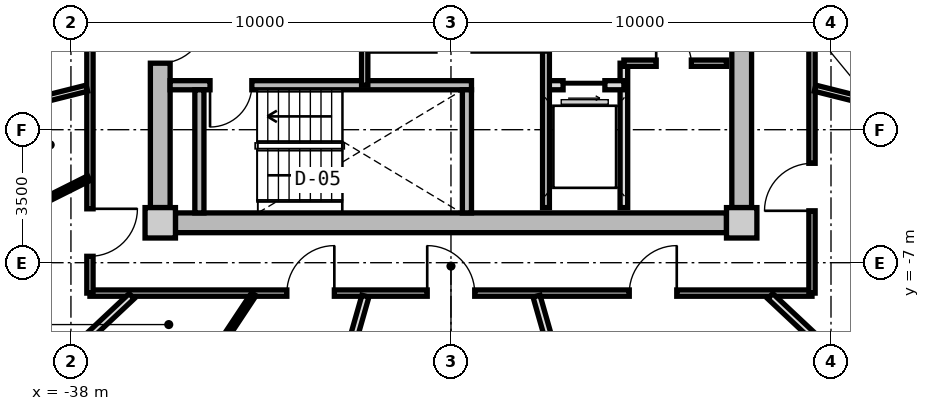
"""IFC4 building model, lengths in metres.
Left out: names, types, materials, properties, quantities, classifications, styles, units other than length and angle.
Written with IfcOpenShell. Run it as: python <this file> out.ifc"""

import sys

from ifc_helpers import new_model, si_unit, direction, frame, frame_2d, origin, origin_2d, place, context, subcontext, project, spatial, rectangle, extrude, source, transform, mapped, element, fill, save


model = new_model("IFC4")
c1 = context("Model", 3, precision=1e-05, world=origin(), true_north=direction((0.0, 1.0)))
c2 = subcontext(c1, "Body", "Model", "MODEL_VIEW")
j1 = project(units=[si_unit("LENGTHUNIT", "METRE"), si_unit("PLANEANGLEUNIT", "RADIAN")], contexts=[c1])
p1 = place(None, origin())
s1 = spatial("IfcSite", under=j1, at=p1, CompositionType="ELEMENT")
p2 = place(p1, origin())
s2 = spatial("IfcBuilding", under=s1, at=p2, CompositionType="ELEMENT")
p3 = place(p2, frame((0.0, 0.0, 213.9)))
s3 = spatial("IfcBuildingStorey", under=s2, at=p3, CompositionType="ELEMENT", Elevation=213.9)
m1 = source(origin(), c2, "Body", "SweptSolid", [
    extrude(rectangle(XDim=0.8, YDim=0.8, at=origin_2d()), origin(), (0.0, 0.0, 1.0), 3.05),
])
for number, where, z_axis, x_axis in (
    (1, (-35.65, -5.95, 0.0), (0.0, 0.0, 1.0), (1.0, 0.0, 0.0)),
    (2, (-20.35, -5.95, 0.0), (0.0, 0.0, 1.0), (1.0, 0.0, 0.0)),
):
    element("IfcColumn", number, at=place(p3, frame(where, z_axis=z_axis, x_axis=x_axis)), inside=s3, PredefinedType="COLUMN", context=c2, shape_type="MappedRepresentation", body=[
        mapped(m1, transform((0.0, 0.0, 0.0), x_axis=(1.0, 0.0, 0.0), y_axis=(0.0, 1.0, 0.0), z_axis=(0.0, 0.0, 1.0), scale=1.0)),
    ])
m2 = source(origin(), c2, "Body", "SweptSolid", [
    extrude(rectangle(XDim=14.5, YDim=0.52, at=frame_2d((7.25, 0.0))), origin(), (0.0, 0.0, 1.0), 2.76),
])
p4 = place(p3, frame((-20.75, -5.95, 0.0), z_axis=(0.0, 0.0, 1.0), x_axis=(-1.0, 0.0, 0.0)))
e3 = element("IfcWall", 3, at=p4, inside=s3, PredefinedType="SHEAR", context=c2, shape_type="MappedRepresentation", body=[
    mapped(m2, transform((0.0, 0.0, 0.0), x_axis=(1.0, 0.0, 0.0), y_axis=(0.0, 1.0, 0.0), z_axis=(0.0, 0.0, 1.0), scale=1.0)),
])
m3 = source(origin(), c2, "Body", "SweptSolid", [
    extrude(rectangle(XDim=11.1, YDim=0.52, at=frame_2d((5.55, 0.0))), origin(), (0.0, 0.0, 1.0), 2.76),
])
p5 = place(p3, frame((-35.65, -5.55, 0.0), z_axis=(0.0, 0.0, 1.0), x_axis=(0.0, 1.0, 0.0)))
e4 = element("IfcWall", 4, at=p5, inside=s3, PredefinedType="SHEAR", context=c2, shape_type="MappedRepresentation", body=[
    mapped(m3, transform((0.0, 0.0, 0.0), x_axis=(1.0, 0.0, 0.0), y_axis=(0.0, 1.0, 0.0), z_axis=(0.0, 0.0, 1.0), scale=1.0)),
])
p6 = place(p5, frame((3.8, 0.0, 0.0)))
e5 = element("IfcOpeningElement", 5, at=p6, cuts=e4, PredefinedType="OPENING", context=c2, shape_type="SweptSolid", body=[
    extrude(rectangle(XDim=1.2, YDim=2.15, at=frame_2d((0.6, 1.075))), frame((0.0, 0.27, 0.0), z_axis=(0.0, -1.0, 0.0), x_axis=(1.0, 0.0, 0.0)), (0.0, 0.0, 1.0), 0.54),
])
p7 = place(p3, frame((-20.35, 5.55, 0.0), z_axis=(0.0, 0.0, 1.0), x_axis=(0.0, -1.0, 0.0)))
e6 = element("IfcWall", 6, at=p7, inside=s3, PredefinedType="SHEAR", context=c2, shape_type="MappedRepresentation", body=[
    mapped(m3, transform((0.0, 0.0, 0.0), x_axis=(1.0, 0.0, 0.0), y_axis=(0.0, 1.0, 0.0), z_axis=(0.0, 0.0, 1.0), scale=1.0)),
])
p8 = place(p7, frame((5.65, 0.0, 0.0)))
e7 = element("IfcOpeningElement", 7, at=p8, cuts=e6, PredefinedType="OPENING", context=c2, shape_type="SweptSolid", body=[
    extrude(rectangle(XDim=1.2, YDim=2.15, at=frame_2d((0.6, 1.075))), frame((0.0, 0.27, 0.0), z_axis=(0.0, -1.0, 0.0), x_axis=(1.0, 0.0, 0.0)), (0.0, 0.0, 1.0), 0.54),
])
m4 = source(origin(), c2, "Body", "SweptSolid", [
    extrude(rectangle(XDim=7.93, YDim=0.24, at=frame_2d((3.965, 0.0))), origin(), (0.0, 0.0, 1.0), 2.76),
])
p9 = place(p3, frame((-35.39, -2.33, 0.0), z_axis=(0.0, 0.0, 1.0), x_axis=(1.0, 0.0, 0.0)))
e8 = element("IfcWall", 8, at=p9, inside=s3, PredefinedType="PARTITIONING", context=c2, shape_type="MappedRepresentation", body=[
    mapped(m4, transform((0.0, 0.0, 0.0), x_axis=(1.0, 0.0, 0.0), y_axis=(0.0, 1.0, 0.0), z_axis=(0.0, 0.0, 1.0), scale=1.0)),
])
p10 = place(p9, frame((1.05, 0.0, 0.0)))
e9 = element("IfcOpeningElement", 9, at=p10, cuts=e8, PredefinedType="OPENING", context=c2, shape_type="SweptSolid", body=[
    extrude(rectangle(XDim=1.1, YDim=2.15, at=frame_2d((0.55, 1.075))), frame((0.0, 0.13, 0.0), z_axis=(0.0, -1.0, 0.0), x_axis=(1.0, 0.0, 0.0)), (0.0, 0.0, 1.0), 0.26),
])
m5 = source(origin(), c2, "Body", "SweptSolid", [
    extrude(rectangle(XDim=3.24, YDim=0.24, at=frame_2d((1.62, 0.0))), origin(), (0.0, 0.0, 1.0), 2.76),
])
for number, where, z_axis, x_axis in (
    (10, (-34.62, -5.69, 0.0), (0.0, 0.0, 1.0), (0.0, 1.0, 0.0)),
    (11, (-27.58, -5.69, 0.0), (0.0, 0.0, 1.0), (0.0, 1.0, 0.0)),
):
    element("IfcWall", number, at=place(p3, frame(where, z_axis=z_axis, x_axis=x_axis)), inside=s3, PredefinedType="PARTITIONING", context=c2, shape_type="MappedRepresentation", body=[
        mapped(m5, transform((0.0, 0.0, 0.0), x_axis=(1.0, 0.0, 0.0), y_axis=(0.0, 1.0, 0.0), z_axis=(0.0, 0.0, 1.0), scale=1.0)),
    ])
m6 = source(origin(), c2, "Body", "SweptSolid", [
    extrude(rectangle(XDim=3.8, YDim=0.2, at=frame_2d((1.9, 0.0))), origin(), (0.0, 0.0, 1.0), 2.745),
])
p11 = place(p3, frame((-23.45, -5.55, 0.0), z_axis=(0.0, 0.0, 1.0), x_axis=(0.0, 1.0, 0.0)))
e12 = element("IfcWall", 12, at=p11, inside=s3, PredefinedType="PARTITIONING", context=c2, shape_type="MappedRepresentation", body=[
    mapped(m6, transform((0.0, 0.0, 0.0), x_axis=(1.0, 0.0, 0.0), y_axis=(0.0, 1.0, 0.0), z_axis=(0.0, 0.0, 1.0), scale=1.0)),
])
m7 = source(origin(), c2, "Body", "SweptSolid", [
    extrude(rectangle(XDim=2.05, YDim=0.24, at=frame_2d((1.025, 0.0))), origin(), (0.0, 0.0, 1.0), 2.745),
])
p12 = place(p3, frame((-25.5, -2.33, 0.0), z_axis=(0.0, 0.0, 1.0), x_axis=(1.0, 0.0, 0.0)))
e13 = element("IfcWall", 13, at=p12, inside=s3, PredefinedType="PARTITIONING", context=c2, shape_type="MappedRepresentation", body=[
    mapped(m7, transform((0.0, 0.0, 0.0), x_axis=(1.0, 0.0, 0.0), y_axis=(0.0, 1.0, 0.0), z_axis=(0.0, 0.0, 1.0), scale=1.0)),
])
p13 = place(p12, frame((0.45, 0.0, 0.0)))
e14 = element("IfcOpeningElement", 14, at=p13, cuts=e13, PredefinedType="OPENING", context=c2, shape_type="SweptSolid", body=[
    extrude(rectangle(XDim=1.1, YDim=2.2, at=frame_2d((0.55, 1.1))), frame((0.0, 0.13, 0.0), z_axis=(0.0, -1.0, 0.0), x_axis=(1.0, 0.0, 0.0)), (0.0, 0.0, 1.0), 0.26),
])
m8 = source(origin(), c2, "Body", "SweptSolid", [
    extrude(rectangle(XDim=4.2, YDim=0.18, at=frame_2d((2.1, 0.0))), origin(), (0.0, 0.0, 1.0), 2.745),
])
p14 = place(p3, frame((-25.5, -5.55, 0.0), z_axis=(0.0, 0.0, 1.0), x_axis=(0.0, 1.0, 0.0)))
e15 = element("IfcWall", 15, at=p14, inside=s3, PredefinedType="PARTITIONING", context=c2, shape_type="MappedRepresentation", body=[
    mapped(m8, transform((0.0, 0.0, 0.0), x_axis=(1.0, 0.0, 0.0), y_axis=(0.0, 1.0, 0.0), z_axis=(0.0, 0.0, 1.0), scale=1.0)),
])
m9 = source(origin(), c2, "Body", "SweptSolid", [
    extrude(rectangle(XDim=0.98, YDim=0.165, at=frame_2d((0.49, 0.0))), origin(), (0.0, 0.0, 1.0), 2.745),
])
p15 = place(p3, frame((-30.27, -2.33, 0.0), z_axis=(0.0, 0.0, 1.0), x_axis=(0.0, 1.0, 0.0)))
e16 = element("IfcWall", 16, at=p15, inside=s3, PredefinedType="PARTITIONING", context=c2, shape_type="MappedRepresentation", body=[
    mapped(m9, transform((0.0, 0.0, 0.0), x_axis=(1.0, 0.0, 0.0), y_axis=(0.0, 1.0, 0.0), z_axis=(0.0, 0.0, 1.0), scale=1.0)),
])
m10 = source(origin(), c2, "Body", "SweptSolid", [
    extrude(rectangle(XDim=2.7, YDim=0.165, at=frame_2d((1.35, 0.0))), origin(), (0.0, 0.0, 1.0), 2.745),
])
p16 = place(p3, frame((-23.45, -1.75, 0.0), z_axis=(0.0, 0.0, 1.0), x_axis=(1.0, 0.0, 0.0)))
e17 = element("IfcWall", 17, at=p16, inside=s3, PredefinedType="PARTITIONING", context=c2, shape_type="MappedRepresentation", body=[
    mapped(m10, transform((0.0, 0.0, 0.0), x_axis=(1.0, 0.0, 0.0), y_axis=(0.0, 1.0, 0.0), z_axis=(0.0, 0.0, 1.0), scale=1.0)),
])
p17 = place(p16, frame((0.85, 0.0, 0.0)))
e18 = element("IfcOpeningElement", 18, at=p17, cuts=e17, PredefinedType="OPENING", context=c2, shape_type="SweptSolid", body=[
    extrude(rectangle(XDim=0.925, YDim=2.1, at=frame_2d((0.462, 1.05))), frame((0.0, 0.093, 0.0), z_axis=(0.0, -1.0, 0.0), x_axis=(1.0, 0.0, 0.0)), (0.0, 0.0, 1.0), 0.185),
])
m11 = source(origin(), c2, "Body", "SweptSolid", [
    extrude(rectangle(XDim=19.0, YDim=0.165, at=frame_2d((9.5, 0.0))), origin(), (0.0, 0.0, 1.0), 2.745),
])
p18 = place(p3, frame((-18.5, -7.8, 0.0), z_axis=(0.0, 0.0, 1.0), x_axis=(-1.0, 0.0, 0.0)))
e19 = element("IfcWall", 19, at=p18, inside=s3, PredefinedType="PARTITIONING", context=c2, shape_type="MappedRepresentation", body=[
    mapped(m11, transform((0.0, 0.0, 0.0), x_axis=(1.0, 0.0, 0.0), y_axis=(0.0, 1.0, 0.0), z_axis=(0.0, 0.0, 1.0), scale=1.0)),
])
p19 = place(p18, frame((12.569, 0.0, 0.0)))
e20 = element("IfcOpeningElement", 20, at=p19, cuts=e19, PredefinedType="OPENING", context=c2, shape_type="SweptSolid", body=[
    extrude(rectangle(XDim=1.25, YDim=2.2, at=frame_2d((0.625, 1.1))), frame((0.0, 0.093, 0.0), z_axis=(0.0, -1.0, 0.0), x_axis=(1.0, 0.0, 0.0)), (0.0, 0.0, 1.0), 0.185),
])
p20 = place(p18, frame((8.875, 0.0, 0.0)))
e21 = element("IfcOpeningElement", 21, at=p20, cuts=e19, PredefinedType="OPENING", context=c2, shape_type="SweptSolid", body=[
    extrude(rectangle(XDim=1.25, YDim=2.2, at=frame_2d((0.625, 1.1))), frame((0.0, 0.093, 0.0), z_axis=(0.0, -1.0, 0.0), x_axis=(1.0, 0.0, 0.0)), (0.0, 0.0, 1.0), 0.185),
])
p21 = place(p18, frame((3.559, 0.0, 0.0)))
e22 = element("IfcOpeningElement", 22, at=p21, cuts=e19, PredefinedType="OPENING", context=c2, shape_type="SweptSolid", body=[
    extrude(rectangle(XDim=1.25, YDim=2.2, at=frame_2d((0.625, 1.1))), frame((0.0, 0.093, 0.0), z_axis=(0.0, -1.0, 0.0), x_axis=(1.0, 0.0, 0.0)), (0.0, 0.0, 1.0), 0.185),
])
m12 = source(origin(), c2, "Body", "SweptSolid", [
    extrude(rectangle(XDim=6.88, YDim=0.165, at=frame_2d((3.44, 0.0))), origin(), (0.0, 0.0, 1.0), 2.745),
])
p22 = place(p3, frame((-37.5, -7.8, 0.0), z_axis=(0.0, 0.0, 1.0), x_axis=(0.0, 1.0, 0.0)))
e23 = element("IfcWall", 23, at=p22, inside=s3, PredefinedType="PARTITIONING", context=c2, shape_type="MappedRepresentation", body=[
    mapped(m12, transform((0.0, 0.0, 0.0), x_axis=(1.0, 0.0, 0.0), y_axis=(0.0, 1.0, 0.0), z_axis=(0.0, 0.0, 1.0), scale=1.0)),
])
p23 = place(p22, frame((0.968, 0.0, 0.0)))
e24 = element("IfcOpeningElement", 24, at=p23, cuts=e23, PredefinedType="OPENING", context=c2, shape_type="SweptSolid", body=[
    extrude(rectangle(XDim=1.25, YDim=2.2, at=frame_2d((0.625, 1.1))), frame((0.0, 0.093, 0.0), z_axis=(0.0, -1.0, 0.0), x_axis=(1.0, 0.0, 0.0)), (0.0, 0.0, 1.0), 0.185),
])
p24 = place(p3, frame((-18.5, -0.92, 0.0), z_axis=(0.0, 0.0, 1.0), x_axis=(0.0, -1.0, 0.0)))
e25 = element("IfcWall", 25, at=p24, inside=s3, PredefinedType="PARTITIONING", context=c2, shape_type="MappedRepresentation", body=[
    mapped(m12, transform((0.0, 0.0, 0.0), x_axis=(1.0, 0.0, 0.0), y_axis=(0.0, 1.0, 0.0), z_axis=(0.0, 0.0, 1.0), scale=1.0)),
])
p25 = place(p24, frame((3.464, 0.0, 0.0)))
e26 = element("IfcOpeningElement", 26, at=p25, cuts=e25, PredefinedType="OPENING", context=c2, shape_type="SweptSolid", body=[
    extrude(rectangle(XDim=1.25, YDim=2.2, at=frame_2d((0.625, 1.1))), frame((0.0, 0.093, 0.0), z_axis=(0.0, -1.0, 0.0), x_axis=(1.0, 0.0, 0.0)), (0.0, 0.0, 1.0), 0.185),
])
m13 = source(origin(), c2, "Body", "SweptSolid", [
    extrude(rectangle(XDim=6.157, YDim=0.165, at=frame_2d((3.079, 0.0))), origin(), (0.0, 0.0, 1.0), 2.345),
])
for number, where, z_axis, x_axis in (
    (27, (-37.58, -2.407, 0.0), (0.0, 0.0, 1.0), (-0.97, -0.244, 0.0)),
    (28, (-18.42, -2.407, 0.0), (0.0, 0.0, 1.0), (0.97, -0.244, 0.0)),
):
    element("IfcWall", number, at=place(p3, frame(where, z_axis=z_axis, x_axis=x_axis)), inside=s3, PredefinedType="PARTITIONING", context=c2, shape_type="MappedRepresentation", body=[
        mapped(m13, transform((0.0, 0.0, 0.0), x_axis=(1.0, 0.0, 0.0), y_axis=(0.0, 1.0, 0.0), z_axis=(0.0, 0.0, 1.0), scale=1.0)),
    ])
m14 = source(origin(), c2, "Body", "SweptSolid", [
    extrude(rectangle(XDim=4.089, YDim=0.19, at=frame_2d((2.044, 0.0))), origin(), (0.0, 0.0, 1.0), 2.345),
])
p26 = place(p3, frame((-36.402, -7.88, 0.0), z_axis=(0.0, 0.0, 1.0), x_axis=(-0.729401273609, -0.684086092577, 0.0)))
e29 = element("IfcWall", 29, at=p26, inside=s3, PredefinedType="PARTITIONING", context=c2, shape_type="MappedRepresentation", body=[
    mapped(m14, transform((0.0, 0.0, 0.0), x_axis=(1.0, 0.0, 0.0), y_axis=(0.0, 1.0, 0.0), z_axis=(0.0, 0.0, 1.0), scale=1.0)),
])
m15 = source(origin(), c2, "Body", "SweptSolid", [
    extrude(rectangle(XDim=2.06, YDim=0.14, at=frame_2d((1.03, 0.0))), origin(), (0.0, 0.0, 1.0), 2.745),
])
p27 = place(p3, frame((-37.53, -4.778, 0.0), z_axis=(0.0, 0.0, 1.0), x_axis=(-0.893952568722, -0.448161583444, 0.0)))
e30 = element("IfcWall", 30, at=p27, inside=s3, PredefinedType="PARTITIONING", context=c2, shape_type="MappedRepresentation", body=[
    mapped(m15, transform((0.0, 0.0, 0.0), x_axis=(1.0, 0.0, 0.0), y_axis=(0.0, 1.0, 0.0), z_axis=(0.0, 0.0, 1.0), scale=1.0)),
])
m16 = source(origin(), c2, "Body", "SweptSolid", [
    extrude(rectangle(XDim=6.974, YDim=0.19, at=frame_2d((3.487, 0.0))), origin(), (0.0, 0.0, 1.0), 2.345),
])
p28 = place(p3, frame((-30.251, -7.88, 0.0), z_axis=(0.0, 0.0, 1.0), x_axis=(-0.274707256801, -0.961527910703, 0.0)))
e31 = element("IfcWall", 31, at=p28, inside=s3, PredefinedType="PARTITIONING", context=c2, shape_type="MappedRepresentation", body=[
    mapped(m16, transform((0.0, 0.0, 0.0), x_axis=(1.0, 0.0, 0.0), y_axis=(0.0, 1.0, 0.0), z_axis=(0.0, 0.0, 1.0), scale=1.0)),
])
m17 = source(origin(), c2, "Body", "SweptSolid", [
    extrude(rectangle(XDim=2.953, YDim=0.14, at=frame_2d((1.476, 0.0))), origin(), (0.0, 0.0, 1.0), 2.745),
])
p29 = place(p3, frame((-33.188, -7.83, 0.0), z_axis=(0.0, 0.0, 1.0), x_axis=(-0.552427436518, -0.833560991999, 0.0)))
e32 = element("IfcWall", 32, at=p29, inside=s3, PredefinedType="PARTITIONING", context=c2, shape_type="MappedRepresentation", body=[
    mapped(m17, transform((0.0, 0.0, 0.0), x_axis=(1.0, 0.0, 0.0), y_axis=(0.0, 1.0, 0.0), z_axis=(0.0, 0.0, 1.0), scale=1.0)),
])
p30 = place(p3, frame((-25.749, -7.88, 0.0), z_axis=(0.0, 0.0, 1.0), x_axis=(0.274707256801, -0.961527910703, 0.0)))
e33 = element("IfcWall", 33, at=p30, inside=s3, PredefinedType="PARTITIONING", context=c2, shape_type="MappedRepresentation", body=[
    mapped(m16, transform((0.0, 0.0, 0.0), x_axis=(1.0, 0.0, 0.0), y_axis=(0.0, 1.0, 0.0), z_axis=(0.0, 0.0, 1.0), scale=1.0)),
])
p31 = place(p3, frame((-19.598, -7.88, 0.0), z_axis=(0.0, 0.0, 1.0), x_axis=(0.729401273609, -0.684086092577, 0.0)))
e34 = element("IfcWall", 34, at=p31, inside=s3, PredefinedType="PARTITIONING", context=c2, shape_type="MappedRepresentation", body=[
    mapped(m14, transform((0.0, 0.0, 0.0), x_axis=(1.0, 0.0, 0.0), y_axis=(0.0, 1.0, 0.0), z_axis=(0.0, 0.0, 1.0), scale=1.0)),
])
m18 = source(origin(), c2, "Body", "SweptSolid", [
    extrude(rectangle(XDim=1.1, YDim=2.15, at=frame_2d((0.55, 1.075))), frame((0.0, 0.025, 0.0), z_axis=(0.0, -1.0, 0.0), x_axis=(1.0, 0.0, 0.0)), (0.0, 0.0, 1.0), 0.05),
])
p32 = place(p10, frame((1.1, 0.0, 0.0), z_axis=(0.0, 0.0, 1.0), x_axis=(-1.0, 0.0, 0.0)))
e35 = element("IfcDoor", 35, at=p32, inside=s3, OperationType="SINGLE_SWING_RIGHT", PredefinedType="DOOR", context=c2, shape_type="MappedRepresentation", body=[
    mapped(m18, transform((0.0, 0.0, 0.0), x_axis=(1.0, 0.0, 0.0), y_axis=(0.0, 1.0, 0.0), z_axis=(0.0, 0.0, 1.0), scale=1.0)),
])
fill(e9, e35)
m19 = source(origin(), c2, "Body", "SweptSolid", [
    extrude(rectangle(XDim=1.2, YDim=2.15, at=frame_2d((0.6, 1.075))), frame((0.0, 0.025, 0.0), z_axis=(0.0, -1.0, 0.0), x_axis=(1.0, 0.0, 0.0)), (0.0, 0.0, 1.0), 0.05),
])
p33 = place(p6, frame((1.2, 0.0, 0.0), z_axis=(0.0, 0.0, 1.0), x_axis=(-1.0, 0.0, 0.0)))
e36 = element("IfcDoor", 36, at=p33, inside=s3, OperationType="SINGLE_SWING_LEFT", PredefinedType="DOOR", context=c2, shape_type="MappedRepresentation", body=[
    mapped(m19, transform((0.0, 0.0, 0.0), x_axis=(1.0, 0.0, 0.0), y_axis=(0.0, 1.0, 0.0), z_axis=(0.0, 0.0, 1.0), scale=1.0)),
])
fill(e5, e36)
m20 = source(origin(), c2, "Body", "SweptSolid", [
    extrude(rectangle(XDim=1.1, YDim=2.2, at=frame_2d((0.55, 1.1))), frame((0.0, 0.025, 0.0), z_axis=(0.0, -1.0, 0.0), x_axis=(1.0, 0.0, 0.0)), (0.0, 0.0, 1.0), 0.05),
])
p34 = place(p13, frame((1.1, 0.0, 0.0), z_axis=(0.0, 0.0, 1.0), x_axis=(-1.0, 0.0, 0.0)))
e37 = element("IfcDoor", 37, at=p34, inside=s3, OperationType="SLIDING_TO_RIGHT", PredefinedType="DOOR", context=c2, shape_type="MappedRepresentation", body=[
    mapped(m20, transform((0.0, 0.0, 0.0), x_axis=(1.0, 0.0, 0.0), y_axis=(0.0, 1.0, 0.0), z_axis=(0.0, 0.0, 1.0), scale=1.0)),
])
fill(e14, e37)
m21 = source(origin(), c2, "Body", "SweptSolid", [
    extrude(rectangle(XDim=0.925, YDim=2.1, at=frame_2d((0.462, 1.05))), frame((0.0, 0.025, 0.0), z_axis=(0.0, -1.0, 0.0), x_axis=(1.0, 0.0, 0.0)), (0.0, 0.0, 1.0), 0.05),
])
p35 = place(p17, origin())
e38 = element("IfcDoor", 38, at=p35, inside=s3, OperationType="SINGLE_SWING_LEFT", PredefinedType="DOOR", context=c2, shape_type="MappedRepresentation", body=[
    mapped(m21, transform((0.0, 0.0, 0.0), x_axis=(1.0, 0.0, 0.0), y_axis=(0.0, 1.0, 0.0), z_axis=(0.0, 0.0, 1.0), scale=1.0)),
])
fill(e18, e38)
m22 = source(origin(), c2, "Body", "SweptSolid", [
    extrude(rectangle(XDim=1.25, YDim=2.2, at=frame_2d((0.625, 1.1))), frame((0.0, 0.025, 0.0), z_axis=(0.0, -1.0, 0.0), x_axis=(1.0, 0.0, 0.0)), (0.0, 0.0, 1.0), 0.05),
])
p36 = place(p23, frame((1.25, 0.0, 0.0), z_axis=(0.0, 0.0, 1.0), x_axis=(-1.0, 0.0, 0.0)))
e39 = element("IfcDoor", 39, at=p36, inside=s3, OperationType="SINGLE_SWING_LEFT", PredefinedType="DOOR", context=c2, shape_type="MappedRepresentation", body=[
    mapped(m22, transform((0.0, 0.0, 0.0), x_axis=(1.0, 0.0, 0.0), y_axis=(0.0, 1.0, 0.0), z_axis=(0.0, 0.0, 1.0), scale=1.0)),
])
fill(e24, e39)
p37 = place(p19, frame((1.25, 0.0, 0.0), z_axis=(0.0, 0.0, 1.0), x_axis=(-1.0, 0.0, 0.0)))
e40 = element("IfcDoor", 40, at=p37, inside=s3, OperationType="SINGLE_SWING_RIGHT", PredefinedType="DOOR", context=c2, shape_type="MappedRepresentation", body=[
    mapped(m22, transform((0.0, 0.0, 0.0), x_axis=(1.0, 0.0, 0.0), y_axis=(0.0, 1.0, 0.0), z_axis=(0.0, 0.0, 1.0), scale=1.0)),
])
fill(e20, e40)
p38 = place(p20, frame((1.25, 0.0, 0.0), z_axis=(0.0, 0.0, 1.0), x_axis=(-1.0, 0.0, 0.0)))
e41 = element("IfcDoor", 41, at=p38, inside=s3, OperationType="SINGLE_SWING_LEFT", PredefinedType="DOOR", context=c2, shape_type="MappedRepresentation", body=[
    mapped(m22, transform((0.0, 0.0, 0.0), x_axis=(1.0, 0.0, 0.0), y_axis=(0.0, 1.0, 0.0), z_axis=(0.0, 0.0, 1.0), scale=1.0)),
])
fill(e21, e41)
p39 = place(p21, frame((1.25, 0.0, 0.0), z_axis=(0.0, 0.0, 1.0), x_axis=(-1.0, 0.0, 0.0)))
e42 = element("IfcDoor", 42, at=p39, inside=s3, OperationType="SINGLE_SWING_RIGHT", PredefinedType="DOOR", context=c2, shape_type="MappedRepresentation", body=[
    mapped(m22, transform((0.0, 0.0, 0.0), x_axis=(1.0, 0.0, 0.0), y_axis=(0.0, 1.0, 0.0), z_axis=(0.0, 0.0, 1.0), scale=1.0)),
])
fill(e22, e42)
p40 = place(p25, frame((1.25, 0.0, 0.0), z_axis=(0.0, 0.0, 1.0), x_axis=(-1.0, 0.0, 0.0)))
e43 = element("IfcDoor", 43, at=p40, inside=s3, OperationType="SINGLE_SWING_LEFT", PredefinedType="DOOR", context=c2, shape_type="MappedRepresentation", body=[
    mapped(m22, transform((0.0, 0.0, 0.0), x_axis=(1.0, 0.0, 0.0), y_axis=(0.0, 1.0, 0.0), z_axis=(0.0, 0.0, 1.0), scale=1.0)),
])
fill(e26, e43)
save(model, sys.argv[1])
